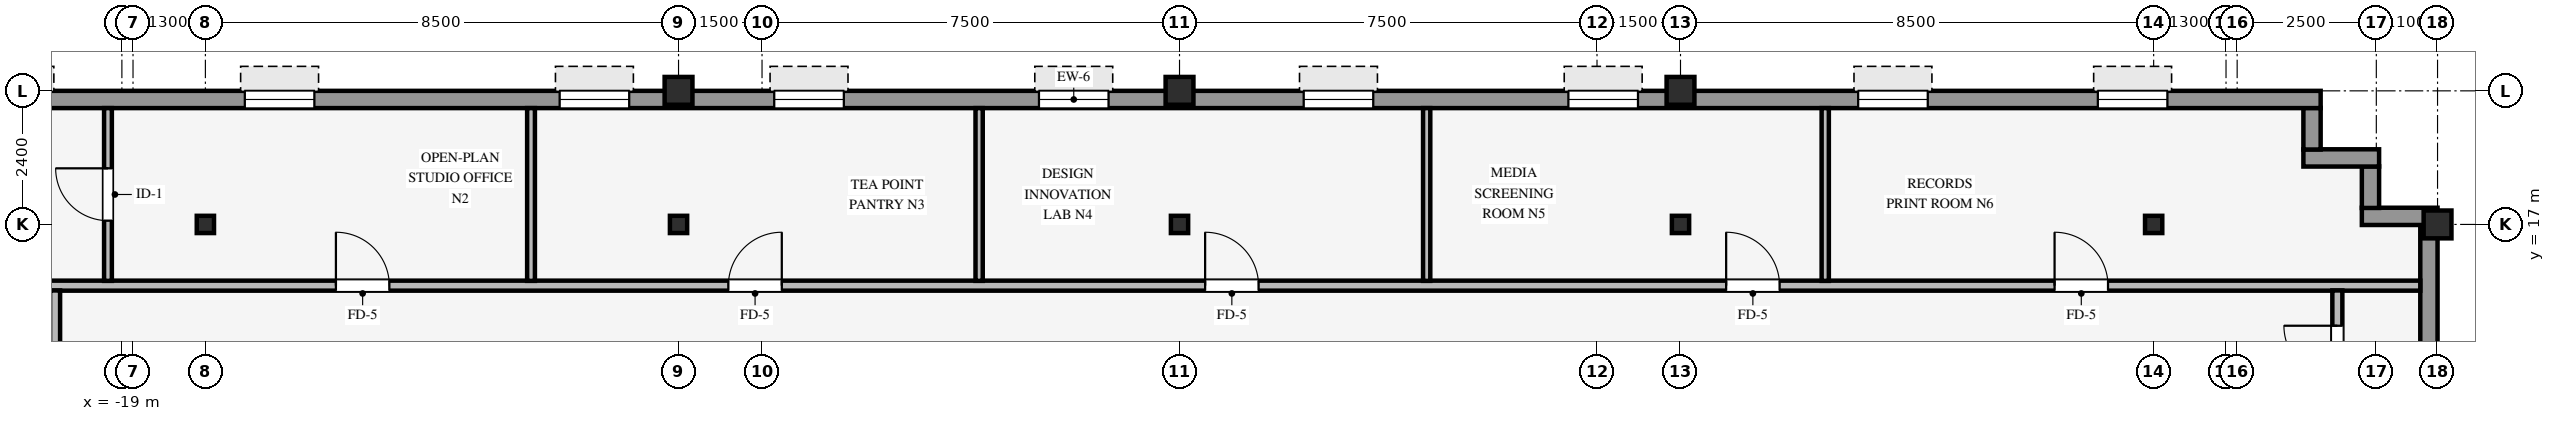
"""IFC4 building model, lengths in metres.
Left out: names, types, materials, properties, quantities, classifications, styles, units other than length and angle.
Written with IfcOpenShell. Run it as: python <this file> out.ifc"""

import sys

from ifc_helpers import new_model, si_unit, direction, frame, frame_2d, origin, origin_2d, place, context, subcontext, project, spatial, rectangle, hollow_rectangle, i_section, extrude, source, transform, mapped, element, fill, save


model = new_model("IFC4")
c1 = context("Model", 3, precision=1e-05, world=origin(), true_north=direction((0.0, 1.0)))
c2 = subcontext(c1, "Body", "Model", "MODEL_VIEW")
j1 = project(units=[si_unit("LENGTHUNIT", "METRE"), si_unit("PLANEANGLEUNIT", "RADIAN")], contexts=[c1])
p1 = place(None, origin())
s1 = spatial("IfcSite", under=j1, at=p1, CompositionType="ELEMENT")
p2 = place(p1, origin())
s2 = spatial("IfcBuilding", under=s1, at=p2, CompositionType="ELEMENT")
p3 = place(p2, frame((0.0, 0.0, 201.85)))
s3 = spatial("IfcBuildingStorey", under=s2, at=p3, CompositionType="ELEMENT", Elevation=201.85)
for number, where, z_axis, x_axis in (
    (1, (22.6, 17.0, 0.0), (0.0, 0.0, 1.0), (1.0, 0.0, 0.0)),
    (2, (-9.0, 19.4, 0.0), (0.0, 0.0, 1.0), (1.0, 0.0, 0.0)),
    (3, (0.0, 19.4, 0.0), (0.0, 0.0, 1.0), (1.0, 0.0, 0.0)),
    (4, (9.0, 19.4, 0.0), (0.0, 0.0, 1.0), (1.0, 0.0, 0.0)),
):
    element("IfcColumn", number, at=place(p3, frame(where, z_axis=z_axis, x_axis=x_axis)), inside=s3, PredefinedType="COLUMN", context=c2, shape_type="SweptSolid", body=[
        extrude(hollow_rectangle(XDim=0.5, YDim=0.5, WallThickness=0.032, InnerFilletRadius=0.032, OuterFilletRadius=0.064, at=origin_2d()), origin(), (0.0, 0.0, 1.0), 3.37),
    ])
for number, where, z_axis, x_axis in (
    (5, (0.0, 17.0, 0.0), (0.0, 0.0, 1.0), (1.0, 0.0, 0.0)),
    (6, (-17.5, 17.0, 0.0), (0.0, 0.0, 1.0), (1.0, 0.0, 0.0)),
    (7, (-9.0, 17.0, 0.0), (0.0, 0.0, 1.0), (1.0, 0.0, 0.0)),
    (8, (9.0, 17.0, 0.0), (0.0, 0.0, 1.0), (1.0, 0.0, 0.0)),
    (9, (17.5, 17.0, 0.0), (0.0, 0.0, 1.0), (1.0, 0.0, 0.0)),
):
    element("IfcColumn", number, at=place(p3, frame(where, z_axis=z_axis, x_axis=x_axis)), inside=s3, PredefinedType="COLUMN", context=c2, shape_type="SweptSolid", body=[
        extrude(i_section(OverallWidth=0.31, OverallDepth=0.31, WebThickness=0.015, FlangeThickness=0.015, FilletRadius=0.015, at=origin_2d()), origin(), (0.0, 0.0, 1.0), 3.37),
    ])
p4 = place(p3, frame((22.445, -20.794, 0.0), z_axis=(0.0, 0.0, 1.0), x_axis=(0.0, 1.0, 0.0)))
e10 = element("IfcWall", 10, at=p4, inside=s3, PredefinedType="STANDARD", context=c2, shape_type="SweptSolid", body=[
    extrude(rectangle(XDim=37.788, YDim=0.31, at=frame_2d((18.894, 0.0))), origin(), (0.0, 0.0, 1.0), 2.705),
])
p5 = place(p4, frame((16.444, 0.0, 0.0), z_axis=(0.0, 0.0, 1.0), x_axis=(-1.0, 0.0, 0.0)))
e11 = element("IfcOpeningElement", 11, at=p5, cuts=e10, PredefinedType="OPENING", context=c2, shape_type="SweptSolid", body=[
    extrude(rectangle(XDim=1.05, YDim=2.1, at=frame_2d((0.525, 1.05))), frame((0.0, 0.165, 0.0), z_axis=(0.0, -1.0, 0.0), x_axis=(1.0, 0.0, 0.0)), (0.0, 0.0, 1.0), 0.33),
])
p6 = place(p4, frame((7.644, 0.0, 0.8)))
e12 = element("IfcOpeningElement", 12, at=p6, cuts=e10, PredefinedType="OPENING", context=c2, shape_type="SweptSolid", body=[
    extrude(rectangle(XDim=2.05, YDim=1.52, at=frame_2d((1.025, 0.76))), frame((0.0, 0.165, 0.0), z_axis=(0.0, -1.0, 0.0), x_axis=(1.0, 0.0, 0.0)), (0.0, 0.0, 1.0), 0.33),
])
p7 = place(p4, frame((12.756, 0.0, 0.8)))
e13 = element("IfcOpeningElement", 13, at=p7, cuts=e10, PredefinedType="OPENING", context=c2, shape_type="SweptSolid", body=[
    extrude(rectangle(XDim=2.05, YDim=1.52, at=frame_2d((1.025, 0.76))), frame((0.0, 0.165, 0.0), z_axis=(0.0, -1.0, 0.0), x_axis=(1.0, 0.0, 0.0)), (0.0, 0.0, 1.0), 0.33),
])
p8 = place(p4, frame((17.869, 0.0, 0.8)))
e14 = element("IfcOpeningElement", 14, at=p8, cuts=e10, PredefinedType="OPENING", context=c2, shape_type="SweptSolid", body=[
    extrude(rectangle(XDim=2.05, YDim=1.52, at=frame_2d((1.025, 0.76))), frame((0.0, 0.165, 0.0), z_axis=(0.0, -1.0, 0.0), x_axis=(1.0, 0.0, 0.0)), (0.0, 0.0, 1.0), 0.33),
])
p9 = place(p4, frame((22.982, 0.0, 0.8)))
e15 = element("IfcOpeningElement", 15, at=p9, cuts=e10, PredefinedType="OPENING", context=c2, shape_type="SweptSolid", body=[
    extrude(rectangle(XDim=2.05, YDim=1.52, at=frame_2d((1.025, 0.76))), frame((0.0, 0.165, 0.0), z_axis=(0.0, -1.0, 0.0), x_axis=(1.0, 0.0, 0.0)), (0.0, 0.0, 1.0), 0.33),
])
p10 = place(p4, frame((27.194, 0.0, 0.8)))
e16 = element("IfcOpeningElement", 16, at=p10, cuts=e10, PredefinedType="OPENING", context=c2, shape_type="SweptSolid", body=[
    extrude(rectangle(XDim=2.05, YDim=1.52, at=frame_2d((1.025, 0.76))), frame((0.0, 0.165, 0.0), z_axis=(0.0, -1.0, 0.0), x_axis=(1.0, 0.0, 0.0)), (0.0, 0.0, 1.0), 0.33),
])
p11 = place(p4, frame((33.207, 0.0, 0.8)))
e17 = element("IfcOpeningElement", 17, at=p11, cuts=e10, PredefinedType="OPENING", context=c2, shape_type="SweptSolid", body=[
    extrude(rectangle(XDim=2.05, YDim=1.52, at=frame_2d((1.025, 0.76))), frame((0.0, 0.165, 0.0), z_axis=(0.0, -1.0, 0.0), x_axis=(1.0, 0.0, 0.0)), (0.0, 0.0, 1.0), 0.33),
])
p12 = place(p3, frame((21.24, 17.145, 0.0), z_axis=(0.0, 0.0, 1.0), x_axis=(1.0, 0.0, 0.0)))
e18 = element("IfcWall", 18, at=p12, inside=s3, PredefinedType="STANDARD", context=c2, shape_type="SweptSolid", body=[
    extrude(rectangle(XDim=1.36, YDim=0.31, at=frame_2d((0.68, 0.0))), origin(), (0.0, 0.0, 1.0), 2.816),
])
p13 = place(p3, frame((21.395, 17.296, 0.0), z_axis=(0.0, 0.0, 1.0), x_axis=(0.0, 1.0, 0.0)))
e19 = element("IfcWall", 19, at=p13, inside=s3, PredefinedType="STANDARD", context=c2, shape_type="SweptSolid", body=[
    extrude(rectangle(XDim=0.748, YDim=0.31, at=frame_2d((0.374, 0.0))), origin(), (0.0, 0.0, 1.0), 2.816),
])
p14 = place(p3, frame((20.19, 18.195, 0.0), z_axis=(0.0, 0.0, 1.0), x_axis=(1.0, 0.0, 0.0)))
e20 = element("IfcWall", 20, at=p14, inside=s3, PredefinedType="STANDARD", context=c2, shape_type="SweptSolid", body=[
    extrude(rectangle(XDim=1.36, YDim=0.31, at=frame_2d((0.68, 0.0))), origin(), (0.0, 0.0, 1.0), 2.816),
])
p15 = place(p3, frame((20.345, 18.346, 0.0), z_axis=(0.0, 0.0, 1.0), x_axis=(0.0, 1.0, 0.0)))
e21 = element("IfcWall", 21, at=p15, inside=s3, PredefinedType="STANDARD", context=c2, shape_type="SweptSolid", body=[
    extrude(rectangle(XDim=0.748, YDim=0.31, at=frame_2d((0.374, 0.0))), origin(), (0.0, 0.0, 1.0), 2.816),
])
p16 = place(p3, frame((-24.3, 19.245, 0.0), z_axis=(0.0, 0.0, 1.0), x_axis=(1.0, 0.0, 0.0)))
e22 = element("IfcWall", 22, at=p16, inside=s3, PredefinedType="STANDARD", context=c2, shape_type="SweptSolid", body=[
    extrude(rectangle(XDim=44.8, YDim=0.31, at=frame_2d((22.4, 0.0))), origin(), (0.0, 0.0, 1.0), 2.705),
])
p17 = place(p16, frame((2.753, 0.0, 0.8)))
e23 = element("IfcOpeningElement", 23, at=p17, cuts=e22, PredefinedType="OPENING", context=c2, shape_type="SweptSolid", body=[
    extrude(rectangle(XDim=1.25, YDim=1.52, at=frame_2d((0.625, 0.76))), frame((0.0, 0.165, 0.0), z_axis=(0.0, -1.0, 0.0), x_axis=(1.0, 0.0, 0.0)), (0.0, 0.0, 1.0), 0.33),
])
p18 = place(p16, frame((7.508, 0.0, 0.8)))
e24 = element("IfcOpeningElement", 24, at=p18, cuts=e22, PredefinedType="OPENING", context=c2, shape_type="SweptSolid", body=[
    extrude(rectangle(XDim=1.25, YDim=1.52, at=frame_2d((0.625, 0.76))), frame((0.0, 0.165, 0.0), z_axis=(0.0, -1.0, 0.0), x_axis=(1.0, 0.0, 0.0)), (0.0, 0.0, 1.0), 0.33),
])
p19 = place(p16, frame((13.164, 0.0, 0.8)))
e25 = element("IfcOpeningElement", 25, at=p19, cuts=e22, PredefinedType="OPENING", context=c2, shape_type="SweptSolid", body=[
    extrude(rectangle(XDim=1.25, YDim=1.52, at=frame_2d((0.625, 0.76))), frame((0.0, 0.165, 0.0), z_axis=(0.0, -1.0, 0.0), x_axis=(1.0, 0.0, 0.0)), (0.0, 0.0, 1.0), 0.33),
])
p20 = place(p16, frame((17.019, 0.0, 0.8)))
e26 = element("IfcOpeningElement", 26, at=p20, cuts=e22, PredefinedType="OPENING", context=c2, shape_type="SweptSolid", body=[
    extrude(rectangle(XDim=1.25, YDim=1.52, at=frame_2d((0.625, 0.76))), frame((0.0, 0.165, 0.0), z_axis=(0.0, -1.0, 0.0), x_axis=(1.0, 0.0, 0.0)), (0.0, 0.0, 1.0), 0.33),
])
p21 = place(p16, frame((21.775, 0.0, 0.8)))
e27 = element("IfcOpeningElement", 27, at=p21, cuts=e22, PredefinedType="OPENING", context=c2, shape_type="SweptSolid", body=[
    extrude(rectangle(XDim=1.25, YDim=1.52, at=frame_2d((0.625, 0.76))), frame((0.0, 0.165, 0.0), z_axis=(0.0, -1.0, 0.0), x_axis=(1.0, 0.0, 0.0)), (0.0, 0.0, 1.0), 0.33),
])
p22 = place(p16, frame((26.531, 0.0, 0.8)))
e28 = element("IfcOpeningElement", 28, at=p22, cuts=e22, PredefinedType="OPENING", context=c2, shape_type="SweptSolid", body=[
    extrude(rectangle(XDim=1.25, YDim=1.52, at=frame_2d((0.625, 0.76))), frame((0.0, 0.165, 0.0), z_axis=(0.0, -1.0, 0.0), x_axis=(1.0, 0.0, 0.0)), (0.0, 0.0, 1.0), 0.33),
])
p23 = place(p16, frame((31.286, 0.0, 0.8)))
e29 = element("IfcOpeningElement", 29, at=p23, cuts=e22, PredefinedType="OPENING", context=c2, shape_type="SweptSolid", body=[
    extrude(rectangle(XDim=1.25, YDim=1.52, at=frame_2d((0.625, 0.76))), frame((0.0, 0.165, 0.0), z_axis=(0.0, -1.0, 0.0), x_axis=(1.0, 0.0, 0.0)), (0.0, 0.0, 1.0), 0.33),
])
p24 = place(p16, frame((36.492, 0.0, 0.8)))
e30 = element("IfcOpeningElement", 30, at=p24, cuts=e22, PredefinedType="OPENING", context=c2, shape_type="SweptSolid", body=[
    extrude(rectangle(XDim=1.25, YDim=1.52, at=frame_2d((0.625, 0.76))), frame((0.0, 0.165, 0.0), z_axis=(0.0, -1.0, 0.0), x_axis=(1.0, 0.0, 0.0)), (0.0, 0.0, 1.0), 0.33),
])
p25 = place(p16, frame((40.797, 0.0, 0.8)))
e31 = element("IfcOpeningElement", 31, at=p25, cuts=e22, PredefinedType="OPENING", context=c2, shape_type="SweptSolid", body=[
    extrude(rectangle(XDim=1.25, YDim=1.52, at=frame_2d((0.625, 0.76))), frame((0.0, 0.165, 0.0), z_axis=(0.0, -1.0, 0.0), x_axis=(1.0, 0.0, 0.0)), (0.0, 0.0, 1.0), 0.33),
])
p26 = place(p3, frame((-26.09, 15.9, 0.0), z_axis=(0.0, 0.0, 1.0), x_axis=(1.0, 0.0, 0.0)))
e32 = element("IfcWall", 32, at=p26, inside=s3, PredefinedType="PARTITIONING", context=c2, shape_type="SweptSolid", body=[
    extrude(rectangle(XDim=48.38, YDim=0.18, at=frame_2d((24.19, 0.0))), origin(), (0.0, 0.0, 1.0), 3.36),
])
p27 = place(p26, frame((41.81, 0.0, 0.0)))
e33 = element("IfcOpeningElement", 33, at=p27, cuts=e32, PredefinedType="OPENING", context=c2, shape_type="SweptSolid", body=[
    extrude(rectangle(XDim=0.96, YDim=2.1, at=frame_2d((0.48, 1.05))), frame((0.0, 0.1, 0.0), z_axis=(0.0, -1.0, 0.0), x_axis=(1.0, 0.0, 0.0)), (0.0, 0.0, 1.0), 0.2),
])
p28 = place(p26, frame((17.985, 0.0, 0.0)))
e34 = element("IfcOpeningElement", 34, at=p28, cuts=e32, PredefinedType="OPENING", context=c2, shape_type="SweptSolid", body=[
    extrude(rectangle(XDim=0.96, YDim=2.1, at=frame_2d((0.48, 1.05))), frame((0.0, 0.1, 0.0), z_axis=(0.0, -1.0, 0.0), x_axis=(1.0, 0.0, 0.0)), (0.0, 0.0, 1.0), 0.2),
])
p29 = place(p26, frame((26.55, 0.0, 0.0)))
e35 = element("IfcOpeningElement", 35, at=p29, cuts=e32, PredefinedType="OPENING", context=c2, shape_type="SweptSolid", body=[
    extrude(rectangle(XDim=0.96, YDim=2.1, at=frame_2d((0.48, 1.05))), frame((0.0, 0.1, 0.0), z_axis=(0.0, -1.0, 0.0), x_axis=(1.0, 0.0, 0.0)), (0.0, 0.0, 1.0), 0.2),
])
p30 = place(p26, frame((10.935, 0.0, 0.0)))
e36 = element("IfcOpeningElement", 36, at=p30, cuts=e32, PredefinedType="OPENING", context=c2, shape_type="SweptSolid", body=[
    extrude(rectangle(XDim=0.96, YDim=2.1, at=frame_2d((0.48, 1.05))), frame((0.0, 0.1, 0.0), z_axis=(0.0, -1.0, 0.0), x_axis=(1.0, 0.0, 0.0)), (0.0, 0.0, 1.0), 0.2),
])
p31 = place(p26, frame((35.91, 0.0, 0.0)))
e37 = element("IfcOpeningElement", 37, at=p31, cuts=e32, PredefinedType="OPENING", context=c2, shape_type="SweptSolid", body=[
    extrude(rectangle(XDim=0.96, YDim=2.1, at=frame_2d((0.48, 1.05))), frame((0.0, 0.1, 0.0), z_axis=(0.0, -1.0, 0.0), x_axis=(1.0, 0.0, 0.0)), (0.0, 0.0, 1.0), 0.2),
])
p32 = place(p3, frame((-20.2, -15.814, 0.0), z_axis=(0.0, 0.0, 1.0), x_axis=(0.0, 1.0, 0.0)))
e38 = element("IfcWall", 38, at=p32, inside=s3, PredefinedType="PARTITIONING", context=c2, shape_type="SweptSolid", body=[
    extrude(rectangle(XDim=31.628, YDim=0.18, at=frame_2d((15.814, 0.0))), origin(), (0.0, 0.0, 1.0), 3.36),
])
p33 = place(p32, frame((11.434, 0.0, 0.0)))
e39 = element("IfcOpeningElement", 39, at=p33, cuts=e38, PredefinedType="OPENING", context=c2, shape_type="SweptSolid", body=[
    extrude(rectangle(XDim=0.96, YDim=2.1, at=frame_2d((0.48, 1.05))), frame((0.0, 0.1, 0.0), z_axis=(0.0, -1.0, 0.0), x_axis=(1.0, 0.0, 0.0)), (0.0, 0.0, 1.0), 0.2),
])
p34 = place(p32, frame((19.634, 0.0, 0.0)))
e40 = element("IfcOpeningElement", 40, at=p34, cuts=e38, PredefinedType="OPENING", context=c2, shape_type="SweptSolid", body=[
    extrude(rectangle(XDim=0.96, YDim=2.1, at=frame_2d((0.48, 1.05))), frame((0.0, 0.1, 0.0), z_axis=(0.0, -1.0, 0.0), x_axis=(1.0, 0.0, 0.0)), (0.0, 0.0, 1.0), 0.2),
])
p35 = place(p32, frame((4.484, 0.0, 0.0)))
e41 = element("IfcOpeningElement", 41, at=p35, cuts=e38, PredefinedType="OPENING", context=c2, shape_type="SweptSolid", body=[
    extrude(rectangle(XDim=0.96, YDim=2.1, at=frame_2d((0.48, 1.05))), frame((0.0, 0.1, 0.0), z_axis=(0.0, -1.0, 0.0), x_axis=(1.0, 0.0, 0.0)), (0.0, 0.0, 1.0), 0.2),
])
p36 = place(p32, frame((26.184, 0.0, 0.0)))
e42 = element("IfcOpeningElement", 42, at=p36, cuts=e38, PredefinedType="OPENING", context=c2, shape_type="SweptSolid", body=[
    extrude(rectangle(XDim=0.96, YDim=2.1, at=frame_2d((0.48, 1.05))), frame((0.0, 0.1, 0.0), z_axis=(0.0, -1.0, 0.0), x_axis=(1.0, 0.0, 0.0)), (0.0, 0.0, 1.0), 0.2),
])
p37 = place(p3, frame((-19.25, 15.986, 0.0), z_axis=(0.0, 0.0, 1.0), x_axis=(0.0, 1.0, 0.0)))
e43 = element("IfcWall", 43, at=p37, inside=s3, PredefinedType="PARTITIONING", context=c2, shape_type="SweptSolid", body=[
    extrude(rectangle(XDim=3.104, YDim=0.14, at=frame_2d((1.552, 0.0))), origin(), (0.0, 0.0, 1.0), 3.36),
])
p38 = place(p37, frame((1.082, 0.0, 0.0)))
e44 = element("IfcOpeningElement", 44, at=p38, cuts=e43, PredefinedType="OPENING", context=c2, shape_type="SweptSolid", body=[
    extrude(rectangle(XDim=0.94, YDim=2.1, at=frame_2d((0.47, 1.05))), frame((0.0, 0.08, 0.0), z_axis=(0.0, -1.0, 0.0), x_axis=(1.0, 0.0, 0.0)), (0.0, 0.0, 1.0), 0.16),
])
p39 = place(p3, frame((-11.65, 15.986, 0.0), z_axis=(0.0, 0.0, 1.0), x_axis=(0.0, 1.0, 0.0)))
e45 = element("IfcWall", 45, at=p39, inside=s3, PredefinedType="PARTITIONING", context=c2, shape_type="SweptSolid", body=[
    extrude(rectangle(XDim=3.104, YDim=0.14, at=frame_2d((1.552, 0.0))), origin(), (0.0, 0.0, 1.0), 3.36),
])
for number, where, z_axis, x_axis in (
    (46, (-3.6, 15.986, 0.0), (0.0, 0.0, 1.0), (0.0, 1.0, 0.0)),
    (47, (4.44, 15.986, 0.0), (0.0, 0.0, 1.0), (0.0, 1.0, 0.0)),
    (48, (11.6, 15.986, 0.0), (0.0, 0.0, 1.0), (0.0, 1.0, 0.0)),
):
    element("IfcWall", number, at=place(p3, frame(where, z_axis=z_axis, x_axis=x_axis)), inside=s3, PredefinedType="PARTITIONING", context=c2, shape_type="SweptSolid", body=[
        extrude(rectangle(XDim=3.104, YDim=0.13, at=frame_2d((1.552, 0.0))), origin(), (0.0, 0.0, 1.0), 3.36),
    ])
p40 = place(p3, frame((20.8, 13.586, 0.0), z_axis=(0.0, 0.0, 1.0), x_axis=(0.0, 1.0, 0.0)))
e49 = element("IfcWall", 49, at=p40, inside=s3, PredefinedType="PARTITIONING", context=c2, shape_type="SweptSolid", body=[
    extrude(rectangle(XDim=2.228, YDim=0.18, at=frame_2d((1.114, 0.0))), origin(), (0.0, 0.0, 1.0), 3.36),
])
p41 = place(p40, frame((0.634, 0.0, 0.0)))
e50 = element("IfcOpeningElement", 50, at=p41, cuts=e49, PredefinedType="OPENING", context=c2, shape_type="SweptSolid", body=[
    extrude(rectangle(XDim=0.96, YDim=2.1, at=frame_2d((0.48, 1.05))), frame((0.0, 0.1, 0.0), z_axis=(0.0, -1.0, 0.0), x_axis=(1.0, 0.0, 0.0)), (0.0, 0.0, 1.0), 0.2),
])
m1 = source(origin(), c2, "Body", "SweptSolid", [
    extrude(rectangle(XDim=1.25, YDim=1.52, at=frame_2d((0.625, 0.76))), frame((0.0, 0.03, 0.0), z_axis=(0.0, -1.0, 0.0), x_axis=(1.0, 0.0, 0.0)), (0.0, 0.0, 1.0), 0.06),
])
p42 = place(p18, origin())
e51 = element("IfcWindow", 51, at=p42, inside=s3, PartitioningType="SINGLE_PANEL", PredefinedType="WINDOW", context=c2, shape_type="MappedRepresentation", body=[
    mapped(m1, transform((0.0, 0.0, 0.0), scale=1.0)),
])
fill(e24, e51)
p43 = place(p19, origin())
e52 = element("IfcWindow", 52, at=p43, inside=s3, PartitioningType="SINGLE_PANEL", PredefinedType="WINDOW", context=c2, shape_type="MappedRepresentation", body=[
    mapped(m1, transform((0.0, 0.0, 0.0), scale=1.0)),
])
fill(e25, e52)
p44 = place(p20, origin())
e53 = element("IfcWindow", 53, at=p44, inside=s3, PartitioningType="SINGLE_PANEL", PredefinedType="WINDOW", context=c2, shape_type="MappedRepresentation", body=[
    mapped(m1, transform((0.0, 0.0, 0.0), scale=1.0)),
])
fill(e26, e53)
p45 = place(p21, origin())
e54 = element("IfcWindow", 54, at=p45, inside=s3, PartitioningType="SINGLE_PANEL", PredefinedType="WINDOW", context=c2, shape_type="MappedRepresentation", body=[
    mapped(m1, transform((0.0, 0.0, 0.0), scale=1.0)),
])
fill(e27, e54)
p46 = place(p22, origin())
e55 = element("IfcWindow", 55, at=p46, inside=s3, PartitioningType="SINGLE_PANEL", PredefinedType="WINDOW", context=c2, shape_type="MappedRepresentation", body=[
    mapped(m1, transform((0.0, 0.0, 0.0), scale=1.0)),
])
fill(e28, e55)
p47 = place(p23, origin())
e56 = element("IfcWindow", 56, at=p47, inside=s3, PartitioningType="SINGLE_PANEL", PredefinedType="WINDOW", context=c2, shape_type="MappedRepresentation", body=[
    mapped(m1, transform((0.0, 0.0, 0.0), scale=1.0)),
])
fill(e29, e56)
p48 = place(p24, origin())
e57 = element("IfcWindow", 57, at=p48, inside=s3, PartitioningType="SINGLE_PANEL", PredefinedType="WINDOW", context=c2, shape_type="MappedRepresentation", body=[
    mapped(m1, transform((0.0, 0.0, 0.0), scale=1.0)),
])
fill(e30, e57)
p49 = place(p25, origin())
e58 = element("IfcWindow", 58, at=p49, inside=s3, PartitioningType="SINGLE_PANEL", PredefinedType="WINDOW", context=c2, shape_type="MappedRepresentation", body=[
    mapped(m1, transform((0.0, 0.0, 0.0), scale=1.0)),
])
fill(e31, e58)
m2 = source(origin(), c2, "Body", "SweptSolid", [
    extrude(rectangle(XDim=0.96, YDim=2.1, at=frame_2d((0.48, 1.05))), frame((0.0, 0.025, 0.0), z_axis=(0.0, -1.0, 0.0), x_axis=(1.0, 0.0, 0.0)), (0.0, 0.0, 1.0), 0.05),
])
p50 = place(p27, origin())
e59 = element("IfcDoor", 59, at=p50, inside=s3, OperationType="SINGLE_SWING_LEFT", PredefinedType="DOOR", context=c2, shape_type="MappedRepresentation", body=[
    mapped(m2, transform((0.0, 0.0, 0.0), scale=1.0)),
])
fill(e33, e59)
p51 = place(p28, origin())
e60 = element("IfcDoor", 60, at=p51, inside=s3, OperationType="SINGLE_SWING_RIGHT", PredefinedType="DOOR", context=c2, shape_type="MappedRepresentation", body=[
    mapped(m2, transform((0.0, 0.0, 0.0), scale=1.0)),
])
fill(e34, e60)
p52 = place(p29, origin())
e61 = element("IfcDoor", 61, at=p52, inside=s3, OperationType="SINGLE_SWING_LEFT", PredefinedType="DOOR", context=c2, shape_type="MappedRepresentation", body=[
    mapped(m2, transform((0.0, 0.0, 0.0), scale=1.0)),
])
fill(e35, e61)
p53 = place(p30, origin())
e62 = element("IfcDoor", 62, at=p53, inside=s3, OperationType="SINGLE_SWING_LEFT", PredefinedType="DOOR", context=c2, shape_type="MappedRepresentation", body=[
    mapped(m2, transform((0.0, 0.0, 0.0), scale=1.0)),
])
fill(e36, e62)
p54 = place(p31, origin())
e63 = element("IfcDoor", 63, at=p54, inside=s3, OperationType="SINGLE_SWING_LEFT", PredefinedType="DOOR", context=c2, shape_type="MappedRepresentation", body=[
    mapped(m2, transform((0.0, 0.0, 0.0), scale=1.0)),
])
fill(e37, e63)
p55 = place(p41, origin())
e64 = element("IfcDoor", 64, at=p55, inside=s3, OperationType="SINGLE_SWING_RIGHT", PredefinedType="DOOR", context=c2, shape_type="MappedRepresentation", body=[
    mapped(m2, transform((0.0, 0.0, 0.0), scale=1.0)),
])
fill(e50, e64)
m3 = source(origin(), c2, "Body", "SweptSolid", [
    extrude(rectangle(XDim=0.94, YDim=2.1, at=frame_2d((0.47, 1.05))), frame((0.0, 0.025, 0.0), z_axis=(0.0, -1.0, 0.0), x_axis=(1.0, 0.0, 0.0)), (0.0, 0.0, 1.0), 0.05),
])
p56 = place(p38, origin())
e65 = element("IfcDoor", 65, at=p56, inside=s3, OperationType="SINGLE_SWING_RIGHT", PredefinedType="DOOR", context=c2, shape_type="MappedRepresentation", body=[
    mapped(m3, transform((0.0, 0.0, 0.0), scale=1.0)),
])
fill(e44, e65)
save(model, sys.argv[1])
